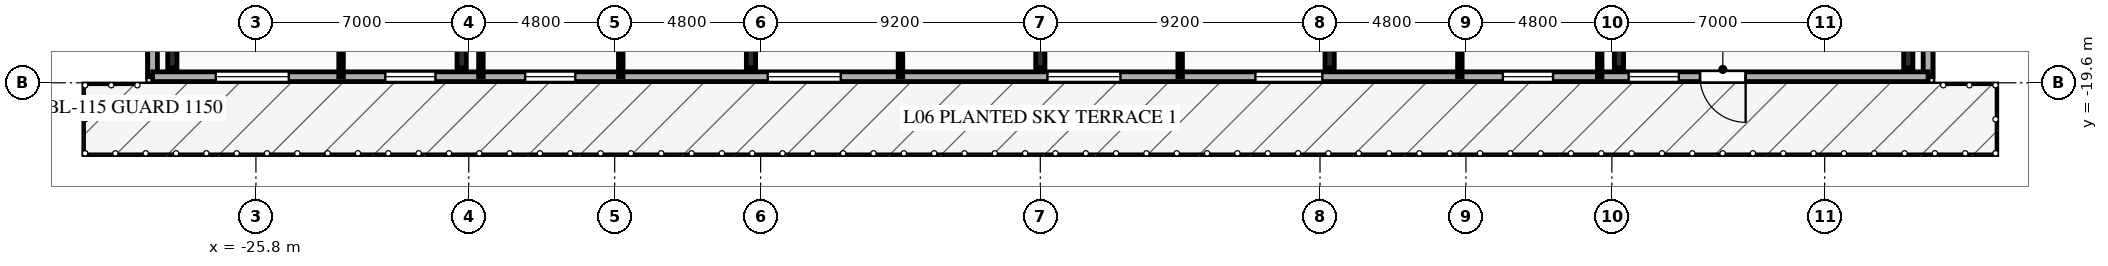
"""IFC4 building model, lengths in metres.
Left out: names, types, materials, properties, quantities, classifications, styles, units other than length and angle.
Written with IfcOpenShell. Run it as: python <this file> out.ifc"""

import sys

from ifc_helpers import new_model, si_unit, direction, frame, frame_2d, origin, origin_2d, place, context, subcontext, project, spatial, rectangle, i_section, extrude, element, fill, save


model = new_model("IFC4")
c1 = context("Model", 3, precision=1e-05, world=origin(), true_north=direction((0.0, 1.0)))
c2 = subcontext(c1, "Body", "Model", "MODEL_VIEW")
j1 = project(units=[si_unit("LENGTHUNIT", "METRE"), si_unit("PLANEANGLEUNIT", "RADIAN")], contexts=[c1])
p1 = place(None, origin())
s1 = spatial("IfcSite", under=j1, at=p1, CompositionType="ELEMENT")
p2 = place(p1, origin())
s2 = spatial("IfcBuilding", under=s1, at=p2, CompositionType="ELEMENT")
p3 = place(p2, frame((0.0, 0.0, 27.0)))
s3 = spatial("IfcBuildingStorey", under=s2, at=p3, CompositionType="ELEMENT", Elevation=27.0)
for number, where, z_axis, x_axis in (
    (1, (-28.55, -18.75, 0.0), (0.0, 0.0, 1.0), (1.0, 0.0, 0.0)),
    (2, (-19.033, -18.75, 0.0), (0.0, 0.0, 1.0), (1.0, 0.0, 0.0)),
    (3, (-9.517, -18.75, 0.0), (0.0, 0.0, 1.0), (1.0, 0.0, 0.0)),
    (4, (0.0, -18.75, 0.0), (0.0, 0.0, 1.0), (1.0, 0.0, 0.0)),
    (5, (9.517, -18.75, 0.0), (0.0, 0.0, 1.0), (1.0, 0.0, 0.0)),
    (6, (19.033, -18.75, 0.0), (0.0, 0.0, 1.0), (1.0, 0.0, 0.0)),
    (7, (28.55, -18.75, 0.0), (0.0, 0.0, 1.0), (1.0, 0.0, 0.0)),
):
    element("IfcColumn", number, at=place(p3, frame(where, z_axis=z_axis, x_axis=x_axis)), inside=s3, PredefinedType="COLUMN", context=c2, shape_type="SweptSolid", body=[
        extrude(i_section(OverallWidth=0.304, OverallDepth=0.716, WebThickness=0.021, FlangeThickness=0.04, FilletRadius=0.027, at=origin_2d()), origin(), (0.0, 0.0, 1.0), 3.35),
    ])
for number, where, z_axis, x_axis in (
    (8, (-29.2, -19.4, 0.0), (0.0, 0.0, 1.0), (0.0, 1.0, 0.0)),
    (9, (29.2, -17.6, 0.0), (0.0, 0.0, 1.0), (0.0, -1.0, 0.0)),
):
    element("IfcWall", number, at=place(p3, frame(where, z_axis=z_axis, x_axis=x_axis)), inside=s3, PredefinedType="SOLIDWALL", context=c2, shape_type="SweptSolid", body=[
        extrude(rectangle(XDim=1.8, YDim=0.32, at=frame_2d((0.9, 0.0))), origin(), (0.0, 0.0, 1.0), 3.035),
    ])
p4 = place(p3, frame((29.2, -19.4, 0.0), z_axis=(0.0, 0.0, 1.0), x_axis=(-1.0, 0.0, 0.0)))
e10 = element("IfcWall", 10, at=p4, inside=s3, PredefinedType="SOLIDWALL", context=c2, shape_type="SweptSolid", body=[
    extrude(rectangle(XDim=58.4, YDim=0.32, at=frame_2d((29.2, 0.0))), origin(), (0.0, 0.0, 1.0), 3.035),
])
p5 = place(p4, frame((6.0, 0.0, 0.0)))
e11 = element("IfcOpeningElement", 11, at=p5, cuts=e10, PredefinedType="OPENING", context=c2, shape_type="SweptSolid", body=[
    extrude(rectangle(XDim=1.5, YDim=2.2, at=frame_2d((0.75, 1.1))), frame((0.0, 0.17, 0.0), z_axis=(0.0, -1.0, 0.0), x_axis=(1.0, 0.0, 0.0)), (0.0, 0.0, 1.0), 0.34),
])
p6 = place(p4, frame((8.198, 0.0, 0.85)))
e12 = element("IfcOpeningElement", 12, at=p6, cuts=e10, PredefinedType="OPENING", context=c2, shape_type="SweptSolid", body=[
    extrude(rectangle(XDim=1.65, YDim=1.85, at=frame_2d((0.825, 0.925))), frame((0.0, 0.17, 0.0), z_axis=(0.0, -1.0, 0.0), x_axis=(1.0, 0.0, 0.0)), (0.0, 0.0, 1.0), 0.34),
])
p7 = place(p4, frame((12.335, 0.0, 0.85)))
e13 = element("IfcOpeningElement", 13, at=p7, cuts=e10, PredefinedType="OPENING", context=c2, shape_type="SweptSolid", body=[
    extrude(rectangle(XDim=1.65, YDim=1.85, at=frame_2d((0.825, 0.925))), frame((0.0, 0.17, 0.0), z_axis=(0.0, -1.0, 0.0), x_axis=(1.0, 0.0, 0.0)), (0.0, 0.0, 1.0), 0.34),
])
p8 = place(p4, frame((19.924, 0.0, 0.85)))
e14 = element("IfcOpeningElement", 14, at=p8, cuts=e10, PredefinedType="OPENING", context=c2, shape_type="SweptSolid", body=[
    extrude(rectangle(XDim=2.2, YDim=1.85, at=frame_2d((1.1, 0.925))), frame((0.0, 0.17, 0.0), z_axis=(0.0, -1.0, 0.0), x_axis=(1.0, 0.0, 0.0)), (0.0, 0.0, 1.0), 0.34),
])
p9 = place(p4, frame((26.565, 0.0, 0.85)))
e15 = element("IfcOpeningElement", 15, at=p9, cuts=e10, PredefinedType="OPENING", context=c2, shape_type="SweptSolid", body=[
    extrude(rectangle(XDim=2.4, YDim=1.95, at=frame_2d((1.2, 0.975))), frame((0.0, 0.17, 0.0), z_axis=(0.0, -1.0, 0.0), x_axis=(1.0, 0.0, 0.0)), (0.0, 0.0, 1.0), 0.34),
])
p10 = place(p4, frame((35.765, 0.0, 0.85)))
e16 = element("IfcOpeningElement", 16, at=p10, cuts=e10, PredefinedType="OPENING", context=c2, shape_type="SweptSolid", body=[
    extrude(rectangle(XDim=2.4, YDim=1.95, at=frame_2d((1.2, 0.975))), frame((0.0, 0.17, 0.0), z_axis=(0.0, -1.0, 0.0), x_axis=(1.0, 0.0, 0.0)), (0.0, 0.0, 1.0), 0.34),
])
p11 = place(p4, frame((44.495, 0.0, 0.85)))
e17 = element("IfcOpeningElement", 17, at=p11, cuts=e10, PredefinedType="OPENING", context=c2, shape_type="SweptSolid", body=[
    extrude(rectangle(XDim=1.65, YDim=1.85, at=frame_2d((0.825, 0.925))), frame((0.0, 0.17, 0.0), z_axis=(0.0, -1.0, 0.0), x_axis=(1.0, 0.0, 0.0)), (0.0, 0.0, 1.0), 0.34),
])
p12 = place(p4, frame((49.095, 0.0, 0.85)))
e18 = element("IfcOpeningElement", 18, at=p12, cuts=e10, PredefinedType="OPENING", context=c2, shape_type="SweptSolid", body=[
    extrude(rectangle(XDim=1.65, YDim=1.85, at=frame_2d((0.825, 0.925))), frame((0.0, 0.17, 0.0), z_axis=(0.0, -1.0, 0.0), x_axis=(1.0, 0.0, 0.0)), (0.0, 0.0, 1.0), 0.34),
])
p13 = place(p4, frame((53.92, 0.0, 0.85)))
e19 = element("IfcOpeningElement", 19, at=p13, cuts=e10, PredefinedType="OPENING", context=c2, shape_type="SweptSolid", body=[
    extrude(rectangle(XDim=2.4, YDim=1.95, at=frame_2d((1.2, 0.975))), frame((0.0, 0.17, 0.0), z_axis=(0.0, -1.0, 0.0), x_axis=(1.0, 0.0, 0.0)), (0.0, 0.0, 1.0), 0.34),
])
for number, where, z_axis, x_axis in (
    (20, (-23.0, -7.75, 0.0), (0.0, 0.0, 1.0), (0.0, -1.0, 0.0)),
    (21, (-18.4, -7.75, 0.0), (0.0, 0.0, 1.0), (0.0, -1.0, 0.0)),
    (22, (-13.8, -7.75, 0.0), (0.0, 0.0, 1.0), (0.0, -1.0, 0.0)),
    (23, (-4.6, -7.75, 0.0), (0.0, 0.0, 1.0), (0.0, -1.0, 0.0)),
):
    element("IfcWall", number, at=place(p3, frame(where, z_axis=z_axis, x_axis=x_axis)), inside=s3, PredefinedType="PARTITIONING", context=c2, shape_type="SweptSolid", body=[
        extrude(rectangle(XDim=11.65, YDim=0.15, at=frame_2d((5.825, 0.0))), origin(), (0.0, 0.0, 1.0), 3.035),
    ])
p14 = place(p3, frame((4.6, -9.9, 0.0), z_axis=(0.0, 0.0, 1.0), x_axis=(0.0, -1.0, 0.0)))
e24 = element("IfcWall", 24, at=p14, inside=s3, PredefinedType="PARTITIONING", context=c2, shape_type="SweptSolid", body=[
    extrude(rectangle(XDim=9.5, YDim=0.15, at=frame_2d((4.75, 0.0))), origin(), (0.0, 0.0, 1.0), 3.035),
])
for number, where, z_axis, x_axis in (
    (25, (13.8, -7.75, 0.0), (0.0, 0.0, 1.0), (0.0, -1.0, 0.0)),
    (26, (18.4, -7.75, 0.0), (0.0, 0.0, 1.0), (0.0, -1.0, 0.0)),
):
    element("IfcWall", number, at=place(p3, frame(where, z_axis=z_axis, x_axis=x_axis)), inside=s3, PredefinedType="PARTITIONING", context=c2, shape_type="SweptSolid", body=[
        extrude(rectangle(XDim=11.65, YDim=0.15, at=frame_2d((5.825, 0.0))), origin(), (0.0, 0.0, 1.0), 3.035),
    ])
p15 = place(p5, origin())
e27 = element("IfcDoor", 27, at=p15, inside=s3, OperationType="SINGLE_SWING_LEFT", PredefinedType="DOOR", context=c2, shape_type="SweptSolid", body=[
    extrude(rectangle(XDim=1.5, YDim=2.2, at=frame_2d((0.75, 1.1))), frame((0.0, 0.025, 0.0), z_axis=(0.0, -1.0, 0.0), x_axis=(1.0, 0.0, 0.0)), (0.0, 0.0, 1.0), 0.05),
])
fill(e11, e27)
p16 = place(p6, origin())
e28 = element("IfcWindow", 28, at=p16, inside=s3, PartitioningType="SINGLE_PANEL", PredefinedType="WINDOW", context=c2, shape_type="SweptSolid", body=[
    extrude(rectangle(XDim=1.65, YDim=1.85, at=frame_2d((0.825, 0.925))), frame((0.0, 0.03, 0.0), z_axis=(0.0, -1.0, 0.0), x_axis=(1.0, 0.0, 0.0)), (0.0, 0.0, 1.0), 0.06),
])
fill(e12, e28)
p17 = place(p7, origin())
e29 = element("IfcWindow", 29, at=p17, inside=s3, PartitioningType="SINGLE_PANEL", PredefinedType="WINDOW", context=c2, shape_type="SweptSolid", body=[
    extrude(rectangle(XDim=1.65, YDim=1.85, at=frame_2d((0.825, 0.925))), frame((0.0, 0.03, 0.0), z_axis=(0.0, -1.0, 0.0), x_axis=(1.0, 0.0, 0.0)), (0.0, 0.0, 1.0), 0.06),
])
fill(e13, e29)
p18 = place(p8, origin())
e30 = element("IfcWindow", 30, at=p18, inside=s3, PartitioningType="SINGLE_PANEL", PredefinedType="WINDOW", context=c2, shape_type="SweptSolid", body=[
    extrude(rectangle(XDim=2.2, YDim=1.85, at=frame_2d((1.1, 0.925))), frame((0.0, 0.03, 0.0), z_axis=(0.0, -1.0, 0.0), x_axis=(1.0, 0.0, 0.0)), (0.0, 0.0, 1.0), 0.06),
])
fill(e14, e30)
p19 = place(p9, origin())
e31 = element("IfcWindow", 31, at=p19, inside=s3, PartitioningType="SINGLE_PANEL", PredefinedType="WINDOW", context=c2, shape_type="SweptSolid", body=[
    extrude(rectangle(XDim=2.4, YDim=1.95, at=frame_2d((1.2, 0.975))), frame((0.0, 0.03, 0.0), z_axis=(0.0, -1.0, 0.0), x_axis=(1.0, 0.0, 0.0)), (0.0, 0.0, 1.0), 0.06),
])
fill(e15, e31)
p20 = place(p10, origin())
e32 = element("IfcWindow", 32, at=p20, inside=s3, PartitioningType="SINGLE_PANEL", PredefinedType="WINDOW", context=c2, shape_type="SweptSolid", body=[
    extrude(rectangle(XDim=2.4, YDim=1.95, at=frame_2d((1.2, 0.975))), frame((0.0, 0.03, 0.0), z_axis=(0.0, -1.0, 0.0), x_axis=(1.0, 0.0, 0.0)), (0.0, 0.0, 1.0), 0.06),
])
fill(e16, e32)
p21 = place(p11, origin())
e33 = element("IfcWindow", 33, at=p21, inside=s3, PartitioningType="SINGLE_PANEL", PredefinedType="WINDOW", context=c2, shape_type="SweptSolid", body=[
    extrude(rectangle(XDim=1.65, YDim=1.85, at=frame_2d((0.825, 0.925))), frame((0.0, 0.03, 0.0), z_axis=(0.0, -1.0, 0.0), x_axis=(1.0, 0.0, 0.0)), (0.0, 0.0, 1.0), 0.06),
])
fill(e17, e33)
p22 = place(p12, origin())
e34 = element("IfcWindow", 34, at=p22, inside=s3, PartitioningType="SINGLE_PANEL", PredefinedType="WINDOW", context=c2, shape_type="SweptSolid", body=[
    extrude(rectangle(XDim=1.65, YDim=1.85, at=frame_2d((0.825, 0.925))), frame((0.0, 0.03, 0.0), z_axis=(0.0, -1.0, 0.0), x_axis=(1.0, 0.0, 0.0)), (0.0, 0.0, 1.0), 0.06),
])
fill(e18, e34)
p23 = place(p13, origin())
e35 = element("IfcWindow", 35, at=p23, inside=s3, PartitioningType="SINGLE_PANEL", PredefinedType="WINDOW", context=c2, shape_type="SweptSolid", body=[
    extrude(rectangle(XDim=2.4, YDim=1.95, at=frame_2d((1.2, 0.975))), frame((0.0, 0.03, 0.0), z_axis=(0.0, -1.0, 0.0), x_axis=(1.0, 0.0, 0.0)), (0.0, 0.0, 1.0), 0.06),
])
fill(e19, e35)
save(model, sys.argv[1])
